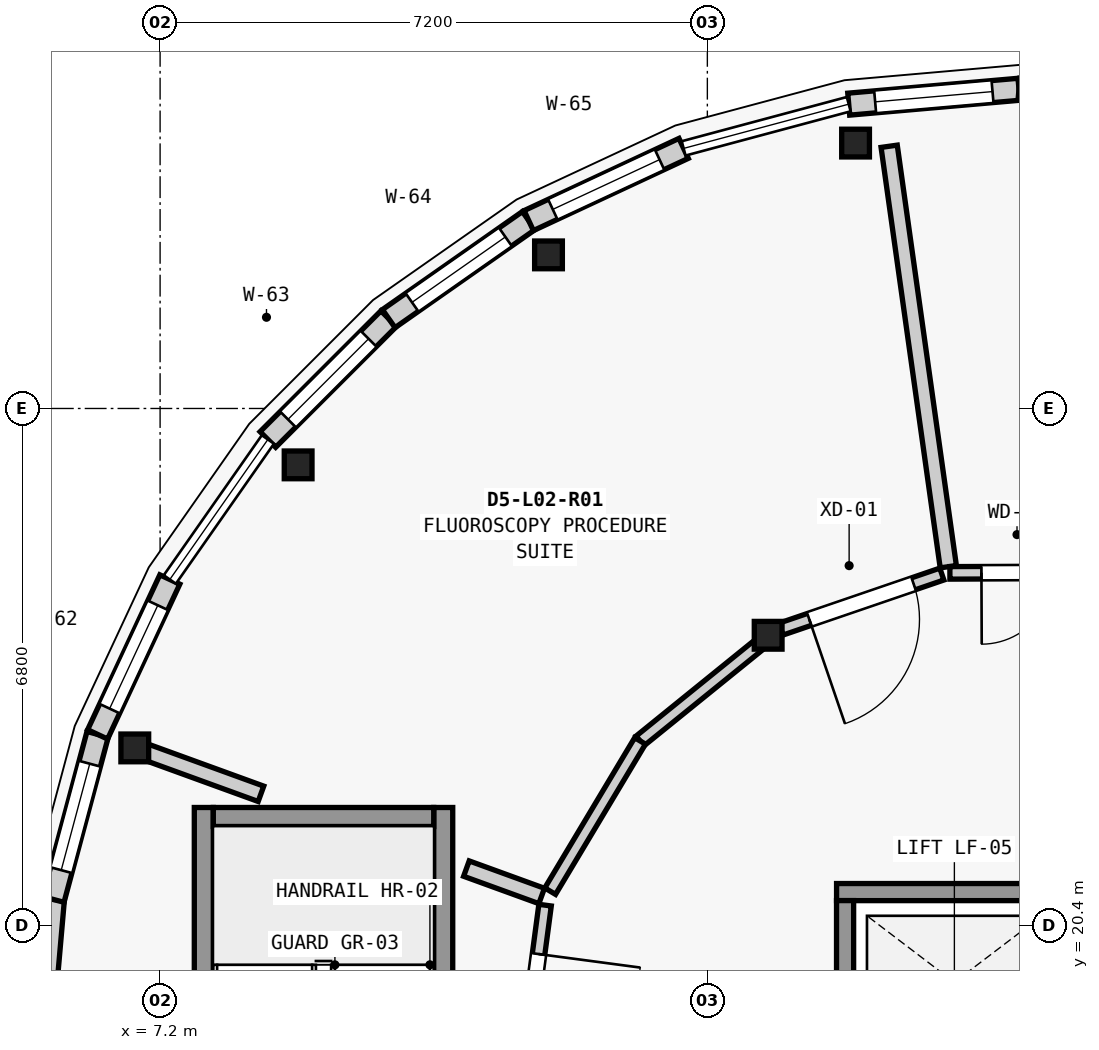
"""IFC4 building model, lengths in metres.
Left out: names, types, materials, properties, quantities, classifications, styles, units other than length and angle.
Written with IfcOpenShell. Run it as: python <this file> out.ifc"""

import sys

from ifc_helpers import new_model, si_unit, direction, frame, frame_2d, origin, origin_2d, place, context, subcontext, project, spatial, rectangle, extrude, element, fill, save


model = new_model("IFC4")
c1 = context("Model", 3, precision=1e-05, world=origin(), true_north=direction((0.0, 1.0)))
c2 = subcontext(c1, "Body", "Model", "MODEL_VIEW")
j1 = project(units=[si_unit("LENGTHUNIT", "METRE"), si_unit("PLANEANGLEUNIT", "RADIAN")], contexts=[c1])
p1 = place(None, origin())
s1 = spatial("IfcSite", under=j1, at=p1, CompositionType="ELEMENT")
p2 = place(p1, origin())
s2 = spatial("IfcBuilding", under=s1, at=p2, CompositionType="ELEMENT")
p3 = place(p2, frame((0.0, 0.0, 8.75)))
s3 = spatial("IfcBuildingStorey", under=s2, at=p3, CompositionType="ELEMENT", Elevation=8.75)
for number, where, z_axis, x_axis in (
    (1, (16.35, 30.692, 0.0), (0.0, 0.0, 1.0), (1.0, 0.0, 0.0)),
    (2, (12.31, 29.221, 0.0), (0.0, 0.0, 1.0), (1.0, 0.0, 0.0)),
    (3, (9.016, 26.458, 0.0), (0.0, 0.0, 1.0), (1.0, 0.0, 0.0)),
    (4, (6.867, 22.734, 0.0), (0.0, 0.0, 1.0), (1.0, 0.0, 0.0)),
    (5, (15.2, 24.216, 0.0), (0.0, 0.0, 1.0), (1.0, 0.0, 0.0)),
):
    element("IfcColumn", number, at=place(p3, frame(where, z_axis=z_axis, x_axis=x_axis)), inside=s3, PredefinedType="COLUMN", context=c2, shape_type="SweptSolid", body=[
        extrude(rectangle(XDim=0.365, YDim=0.365, at=origin_2d()), origin(), (0.0, 0.0, 1.0), 4.2),
    ])
p4 = place(p3, frame((5.6, 18.5, 0.0), z_axis=(0.0, 0.0, 1.0), x_axis=(0.087079400775, 0.996201374201, 0.0)))
e6 = element("IfcWall", 6, at=p4, inside=s3, PredefinedType="ELEMENTEDWALL", context=c2, shape_type="SweptSolid", body=[
    extrude(rectangle(XDim=2.249, YDim=0.29, at=frame_2d((1.124, 0.0))), origin(), (0.0, 0.0, 1.0), 3.329),
])
p5 = place(p3, frame((5.796, 20.74, 0.0), z_axis=(0.0, 0.0, 1.0), x_axis=(0.258824721145, 0.96592430538, 0.0)))
e7 = element("IfcWall", 7, at=p5, inside=s3, PredefinedType="ELEMENTEDWALL", context=c2, shape_type="SweptSolid", body=[
    extrude(rectangle(XDim=2.249, YDim=0.29, at=frame_2d((1.125, 0.0))), origin(), (0.0, 0.0, 1.0), 3.329),
])
p6 = place(p5, frame((0.399, 0.0, 0.85)))
e8 = element("IfcOpeningElement", 8, at=p6, cuts=e7, PredefinedType="OPENING", context=c2, shape_type="SweptSolid", body=[
    extrude(rectangle(XDim=1.45, YDim=2.05, at=frame_2d((0.725, 1.025))), frame((0.0, 0.155, 0.0), z_axis=(0.0, -1.0, 0.0), x_axis=(1.0, 0.0, 0.0)), (0.0, 0.0, 1.0), 0.31),
])
p7 = place(p3, frame((6.378, 22.912, 0.0), z_axis=(0.0, 0.0, 1.0), x_axis=(0.422504983593, 0.906360600886, 0.0)))
e9 = element("IfcWall", 9, at=p7, inside=s3, PredefinedType="ELEMENTEDWALL", context=c2, shape_type="SweptSolid", body=[
    extrude(rectangle(XDim=2.248, YDim=0.29, at=frame_2d((1.124, 0.0))), origin(), (0.0, 0.0, 1.0), 3.329),
])
p8 = place(p7, frame((0.374, 0.0, 0.85)))
e10 = element("IfcOpeningElement", 10, at=p8, cuts=e9, PredefinedType="OPENING", context=c2, shape_type="SweptSolid", body=[
    extrude(rectangle(XDim=1.5, YDim=1.3, at=frame_2d((0.75, 0.65))), frame((0.0, 0.155, 0.0), z_axis=(0.0, -1.0, 0.0), x_axis=(1.0, 0.0, 0.0)), (0.0, 0.0, 1.0), 0.31),
])
p9 = place(p3, frame((8.618, 26.792, 0.0), z_axis=(0.0, 0.0, 1.0), x_axis=(0.707106781187, 0.707106781187, 0.0)))
e11 = element("IfcWall", 11, at=p9, inside=s3, PredefinedType="ELEMENTEDWALL", context=c2, shape_type="SweptSolid", body=[
    extrude(rectangle(XDim=2.249, YDim=0.29, at=frame_2d((1.125, 0.0))), origin(), (0.0, 0.0, 1.0), 3.329),
])
p10 = place(p9, frame((0.374, 0.0, 0.85)))
e12 = element("IfcOpeningElement", 12, at=p10, cuts=e11, PredefinedType="OPENING", context=c2, shape_type="SweptSolid", body=[
    extrude(rectangle(XDim=1.5, YDim=1.65, at=frame_2d((0.75, 0.825))), frame((0.0, 0.155, 0.0), z_axis=(0.0, -1.0, 0.0), x_axis=(1.0, 0.0, 0.0)), (0.0, 0.0, 1.0), 0.31),
])
p11 = place(p3, frame((10.208, 28.382, 0.0), z_axis=(0.0, 0.0, 1.0), x_axis=(0.819104393925, 0.573644482107, 0.0)))
e13 = element("IfcWall", 13, at=p11, inside=s3, PredefinedType="ELEMENTEDWALL", context=c2, shape_type="SweptSolid", body=[
    extrude(rectangle(XDim=2.249, YDim=0.29, at=frame_2d((1.125, 0.0))), origin(), (0.0, 0.0, 1.0), 3.329),
])
p12 = place(p11, frame((0.374, 0.0, 0.85)))
e14 = element("IfcOpeningElement", 14, at=p12, cuts=e13, PredefinedType="OPENING", context=c2, shape_type="SweptSolid", body=[
    extrude(rectangle(XDim=1.5, YDim=1.95, at=frame_2d((0.75, 0.975))), frame((0.0, 0.155, 0.0), z_axis=(0.0, -1.0, 0.0), x_axis=(1.0, 0.0, 0.0)), (0.0, 0.0, 1.0), 0.31),
])
p13 = place(p3, frame((12.05, 29.672, 0.0), z_axis=(0.0, 0.0, 1.0), x_axis=(0.906360600886, 0.422504983593, 0.0)))
e15 = element("IfcWall", 15, at=p13, inside=s3, PredefinedType="ELEMENTEDWALL", context=c2, shape_type="SweptSolid", body=[
    extrude(rectangle(XDim=2.248, YDim=0.29, at=frame_2d((1.124, 0.0))), origin(), (0.0, 0.0, 1.0), 3.329),
])
p14 = place(p13, frame((0.349, 0.0, 0.85)))
e16 = element("IfcOpeningElement", 16, at=p14, cuts=e15, PredefinedType="OPENING", context=c2, shape_type="SweptSolid", body=[
    extrude(rectangle(XDim=1.55, YDim=1.5, at=frame_2d((0.775, 0.75))), frame((0.0, 0.155, 0.0), z_axis=(0.0, -1.0, 0.0), x_axis=(1.0, 0.0, 0.0)), (0.0, 0.0, 1.0), 0.31),
])
p15 = place(p3, frame((16.26, 31.204, 0.0), z_axis=(0.0, 0.0, 1.0), x_axis=(0.996201374201, 0.087079400775, 0.0)))
e17 = element("IfcWall", 17, at=p15, inside=s3, PredefinedType="ELEMENTEDWALL", context=c2, shape_type="SweptSolid", body=[
    extrude(rectangle(XDim=2.249, YDim=0.29, at=frame_2d((1.124, 0.0))), origin(), (0.0, 0.0, 1.0), 3.329),
])
p16 = place(p15, frame((0.349, 0.0, 0.85)))
e18 = element("IfcOpeningElement", 18, at=p16, cuts=e17, PredefinedType="OPENING", context=c2, shape_type="SweptSolid", body=[
    extrude(rectangle(XDim=1.55, YDim=1.8, at=frame_2d((0.775, 0.9))), frame((0.0, 0.155, 0.0), z_axis=(0.0, -1.0, 0.0), x_axis=(1.0, 0.0, 0.0)), (0.0, 0.0, 1.0), 0.31),
])
p17 = place(p3, frame((18.5, 31.4, 0.0), z_axis=(0.0, 0.0, 1.0), x_axis=(0.996201374201, -0.087079400775, 0.0)))
e19 = element("IfcWall", 19, at=p17, inside=s3, PredefinedType="ELEMENTEDWALL", context=c2, shape_type="SweptSolid", body=[
    extrude(rectangle(XDim=2.249, YDim=0.29, at=frame_2d((1.124, 0.0))), origin(), (0.0, 0.0, 1.0), 3.329),
])
p18 = place(p17, frame((0.324, 0.0, 0.85)))
e20 = element("IfcOpeningElement", 20, at=p18, cuts=e19, PredefinedType="OPENING", context=c2, shape_type="SweptSolid", body=[
    extrude(rectangle(XDim=1.6, YDim=1.55, at=frame_2d((0.8, 0.775))), frame((0.0, 0.155, 0.0), z_axis=(0.0, -1.0, 0.0), x_axis=(1.0, 0.0, 0.0)), (0.0, 0.0, 1.0), 0.31),
])
p19 = place(p3, frame((10.925, 15.05, 0.0), z_axis=(0.0, 0.0, 1.0), x_axis=(0.0, 1.0, 0.0)))
e21 = element("IfcWall", 21, at=p19, inside=s3, PredefinedType="SHEAR", context=c2, shape_type="SweptSolid", body=[
    extrude(rectangle(XDim=6.9, YDim=0.25, at=frame_2d((3.45, 0.0))), origin(), (0.0, 0.0, 1.0), 3.975),
])
p20 = place(p19, frame((0.43, 0.0, 0.0)))
e22 = element("IfcOpeningElement", 22, at=p20, cuts=e21, PredefinedType="OPENING", context=c2, shape_type="SweptSolid", body=[
    extrude(rectangle(XDim=1.1, YDim=2.15, at=frame_2d((0.55, 1.075))), frame((0.0, 0.135, 0.0), z_axis=(0.0, -1.0, 0.0), x_axis=(1.0, 0.0, 0.0)), (0.0, 0.0, 1.0), 0.27),
])
p21 = place(p3, frame((7.775, 15.05, 0.0), z_axis=(0.0, 0.0, 1.0), x_axis=(0.0, 1.0, 0.0)))
e23 = element("IfcWall", 23, at=p21, inside=s3, PredefinedType="SHEAR", context=c2, shape_type="SweptSolid", body=[
    extrude(rectangle(XDim=6.9, YDim=0.25, at=frame_2d((3.45, 0.0))), origin(), (0.0, 0.0, 1.0), 3.975),
])
p22 = place(p3, frame((10.8, 21.825, 0.0), z_axis=(0.0, 0.0, 1.0), x_axis=(-1.0, 0.0, 0.0)))
e24 = element("IfcWall", 24, at=p22, inside=s3, PredefinedType="SHEAR", context=c2, shape_type="SweptSolid", body=[
    extrude(rectangle(XDim=2.9, YDim=0.25, at=frame_2d((1.45, 0.0))), origin(), (0.0, 0.0, 1.0), 3.975),
])
p23 = place(p3, frame((16.1, 20.837, 0.0), z_axis=(0.0, 0.0, 1.0), x_axis=(1.0, 0.0, 0.0)))
e25 = element("IfcWall", 25, at=p23, inside=s3, PredefinedType="SHEAR", context=c2, shape_type="SweptSolid", body=[
    extrude(rectangle(XDim=3.1, YDim=0.225, at=frame_2d((1.55, 0.0))), origin(), (0.0, 0.0, 1.0), 3.975),
])
p24 = place(p3, frame((16.212, 18.575, 0.0), z_axis=(0.0, 0.0, 1.0), x_axis=(0.0, 1.0, 0.0)))
e26 = element("IfcWall", 26, at=p24, inside=s3, PredefinedType="SHEAR", context=c2, shape_type="SweptSolid", body=[
    extrude(rectangle(XDim=2.15, YDim=0.225, at=frame_2d((1.075, 0.0))), origin(), (0.0, 0.0, 1.0), 3.975),
])
p25 = place(p3, frame((17.57, 25.118, 0.0), z_axis=(0.0, 0.0, 1.0), x_axis=(-0.139279606871, 0.990253094471, 0.0)))
e27 = element("IfcWall", 27, at=p25, inside=s3, PredefinedType="SOLIDWALL", context=c2, shape_type="SweptSolid", body=[
    extrude(rectangle(XDim=5.586, YDim=0.215, at=frame_2d((2.793, 0.0))), origin(), (0.0, 0.0, 1.0), 3.304),
])
p26 = place(p3, frame((12.22, 20.786, 0.0), z_axis=(0.0, 0.0, 1.0), x_axis=(-0.939759586286, 0.341836101053, 0.0)))
e28 = element("IfcWall", 28, at=p26, inside=s3, PredefinedType="SOLIDWALL", context=c2, shape_type="SweptSolid", body=[
    extrude(rectangle(XDim=1.053, YDim=0.215, at=frame_2d((0.527, 0.0))), origin(), (0.0, 0.0, 1.0), 3.304),
])
p27 = place(p3, frame((8.527, 22.13, 0.0), z_axis=(0.0, 0.0, 1.0), x_axis=(-0.939759586286, 0.341836101053, 0.0)))
e29 = element("IfcWall", 29, at=p27, inside=s3, PredefinedType="SOLIDWALL", context=c2, shape_type="SweptSolid", body=[
    extrude(rectangle(XDim=1.686, YDim=0.215, at=frame_2d((0.843, 0.0))), origin(), (0.0, 0.0, 1.0), 3.304),
])
p28 = place(p3, frame((17.485, 25.021, 0.0), z_axis=(0.0, 0.0, 1.0), x_axis=(-0.94617630085, -0.323651676514, 0.0)))
e30 = element("IfcWall", 30, at=p28, inside=s3, PredefinedType="PARTITIONING", context=c2, shape_type="SweptSolid", body=[
    extrude(rectangle(XDim=2.237, YDim=0.165, at=frame_2d((1.118, 0.0))), origin(), (0.0, 0.0, 1.0), 3.304),
])
p29 = place(p28, frame((0.393, 0.0, 0.0)))
e31 = element("IfcOpeningElement", 31, at=p29, cuts=e30, PredefinedType="OPENING", context=c2, shape_type="SweptSolid", body=[
    extrude(rectangle(XDim=1.45, YDim=2.28, at=frame_2d((0.725, 1.14))), frame((0.0, 0.093, 0.0), z_axis=(0.0, -1.0, 0.0), x_axis=(1.0, 0.0, 0.0)), (0.0, 0.0, 1.0), 0.185),
])
p30 = place(p3, frame((15.068, 24.083, 0.0), z_axis=(0.0, 0.0, 1.0), x_axis=(-0.777315998558, -0.629110354696, 0.0)))
e32 = element("IfcWall", 32, at=p30, inside=s3, PredefinedType="PARTITIONING", context=c2, shape_type="SweptSolid", body=[
    extrude(rectangle(XDim=1.998, YDim=0.165, at=frame_2d((0.999, 0.0))), origin(), (0.0, 0.0, 1.0), 3.304),
])
p31 = place(p3, frame((13.515, 22.826, 0.0), z_axis=(0.0, 0.0, 1.0), x_axis=(-0.513466768532, -0.858109478804, 0.0)))
e33 = element("IfcWall", 33, at=p31, inside=s3, PredefinedType="PARTITIONING", context=c2, shape_type="SweptSolid", body=[
    extrude(rectangle(XDim=2.304, YDim=0.165, at=frame_2d((1.152, 0.0))), origin(), (0.0, 0.0, 1.0), 3.304),
])
p32 = place(p3, frame((12.265, 20.665, 0.0), z_axis=(0.0, 0.0, 1.0), x_axis=(-0.131747018073, -0.991283371811, 0.0)))
e34 = element("IfcWall", 34, at=p32, inside=s3, PredefinedType="PARTITIONING", context=c2, shape_type="SweptSolid", body=[
    extrude(rectangle(XDim=2.648, YDim=0.165, at=frame_2d((1.324, 0.0))), origin(), (0.0, 0.0, 1.0), 3.304),
])
p33 = place(p32, frame((0.649, 0.0, 0.0)))
e35 = element("IfcOpeningElement", 35, at=p33, cuts=e34, PredefinedType="OPENING", context=c2, shape_type="SweptSolid", body=[
    extrude(rectangle(XDim=1.35, YDim=2.22, at=frame_2d((0.675, 1.11))), frame((0.0, 0.093, 0.0), z_axis=(0.0, -1.0, 0.0), x_axis=(1.0, 0.0, 0.0)), (0.0, 0.0, 1.0), 0.185),
])
p34 = place(p3, frame((19.361, 25.044, 0.0), z_axis=(0.0, 0.0, 1.0), x_axis=(-0.999992542295, -0.003862040163, 0.0)))
e36 = element("IfcWall", 36, at=p34, inside=s3, PredefinedType="PARTITIONING", context=c2, shape_type="SweptSolid", body=[
    extrude(rectangle(XDim=1.77, YDim=0.165, at=frame_2d((0.885, 0.0))), origin(), (0.0, 0.0, 1.0), 3.304),
])
p35 = place(p34, frame((0.415, 0.0, 0.0)))
e37 = element("IfcOpeningElement", 37, at=p35, cuts=e36, PredefinedType="OPENING", context=c2, shape_type="SweptSolid", body=[
    extrude(rectangle(XDim=0.94, YDim=2.1, at=frame_2d((0.47, 1.05))), frame((0.0, 0.093, 0.0), z_axis=(0.0, -1.0, 0.0), x_axis=(1.0, 0.0, 0.0)), (0.0, 0.0, 1.0), 0.185),
])
p36 = place(p6, origin())
e38 = element("IfcWindow", 38, at=p36, inside=s3, PartitioningType="SINGLE_PANEL", PredefinedType="WINDOW", context=c2, shape_type="SweptSolid", body=[
    extrude(rectangle(XDim=1.45, YDim=2.05, at=frame_2d((0.725, 1.025))), frame((0.0, 0.03, 0.0), z_axis=(0.0, -1.0, 0.0), x_axis=(1.0, 0.0, 0.0)), (0.0, 0.0, 1.0), 0.06),
])
fill(e8, e38)
p37 = place(p8, origin())
e39 = element("IfcWindow", 39, at=p37, inside=s3, PartitioningType="SINGLE_PANEL", PredefinedType="WINDOW", context=c2, shape_type="SweptSolid", body=[
    extrude(rectangle(XDim=1.5, YDim=1.3, at=frame_2d((0.75, 0.65))), frame((0.0, 0.03, 0.0), z_axis=(0.0, -1.0, 0.0), x_axis=(1.0, 0.0, 0.0)), (0.0, 0.0, 1.0), 0.06),
])
fill(e10, e39)
p38 = place(p10, origin())
e40 = element("IfcWindow", 40, at=p38, inside=s3, PartitioningType="SINGLE_PANEL", PredefinedType="WINDOW", context=c2, shape_type="SweptSolid", body=[
    extrude(rectangle(XDim=1.5, YDim=1.65, at=frame_2d((0.75, 0.825))), frame((0.0, 0.03, 0.0), z_axis=(0.0, -1.0, 0.0), x_axis=(1.0, 0.0, 0.0)), (0.0, 0.0, 1.0), 0.06),
])
fill(e12, e40)
p39 = place(p12, origin())
e41 = element("IfcWindow", 41, at=p39, inside=s3, PartitioningType="SINGLE_PANEL", PredefinedType="WINDOW", context=c2, shape_type="SweptSolid", body=[
    extrude(rectangle(XDim=1.5, YDim=1.95, at=frame_2d((0.75, 0.975))), frame((0.0, 0.03, 0.0), z_axis=(0.0, -1.0, 0.0), x_axis=(1.0, 0.0, 0.0)), (0.0, 0.0, 1.0), 0.06),
])
fill(e14, e41)
p40 = place(p14, origin())
e42 = element("IfcWindow", 42, at=p40, inside=s3, PartitioningType="SINGLE_PANEL", PredefinedType="WINDOW", context=c2, shape_type="SweptSolid", body=[
    extrude(rectangle(XDim=1.55, YDim=1.5, at=frame_2d((0.775, 0.75))), frame((0.0, 0.03, 0.0), z_axis=(0.0, -1.0, 0.0), x_axis=(1.0, 0.0, 0.0)), (0.0, 0.0, 1.0), 0.06),
])
fill(e16, e42)
p41 = place(p16, origin())
e43 = element("IfcWindow", 43, at=p41, inside=s3, PartitioningType="SINGLE_PANEL", PredefinedType="WINDOW", context=c2, shape_type="SweptSolid", body=[
    extrude(rectangle(XDim=1.55, YDim=1.8, at=frame_2d((0.775, 0.9))), frame((0.0, 0.03, 0.0), z_axis=(0.0, -1.0, 0.0), x_axis=(1.0, 0.0, 0.0)), (0.0, 0.0, 1.0), 0.06),
])
fill(e18, e43)
p42 = place(p29, origin())
e44 = element("IfcDoor", 44, at=p42, inside=s3, OperationType="SINGLE_SWING_RIGHT", PredefinedType="DOOR", context=c2, shape_type="SweptSolid", body=[
    extrude(rectangle(XDim=1.45, YDim=2.28, at=frame_2d((0.725, 1.14))), frame((0.0, 0.025, 0.0), z_axis=(0.0, -1.0, 0.0), x_axis=(1.0, 0.0, 0.0)), (0.0, 0.0, 1.0), 0.05),
])
fill(e31, e44)
p43 = place(p33, origin())
e45 = element("IfcDoor", 45, at=p43, inside=s3, OperationType="SINGLE_SWING_LEFT", PredefinedType="DOOR", context=c2, shape_type="SweptSolid", body=[
    extrude(rectangle(XDim=1.35, YDim=2.22, at=frame_2d((0.675, 1.11))), frame((0.0, 0.025, 0.0), z_axis=(0.0, -1.0, 0.0), x_axis=(1.0, 0.0, 0.0)), (0.0, 0.0, 1.0), 0.05),
])
fill(e35, e45)
p44 = place(p35, origin())
e46 = element("IfcDoor", 46, at=p44, inside=s3, OperationType="SINGLE_SWING_RIGHT", PredefinedType="DOOR", context=c2, shape_type="SweptSolid", body=[
    extrude(rectangle(XDim=0.94, YDim=2.1, at=frame_2d((0.47, 1.05))), frame((0.0, 0.025, 0.0), z_axis=(0.0, -1.0, 0.0), x_axis=(1.0, 0.0, 0.0)), (0.0, 0.0, 1.0), 0.05),
])
fill(e37, e46)
save(model, sys.argv[1])
